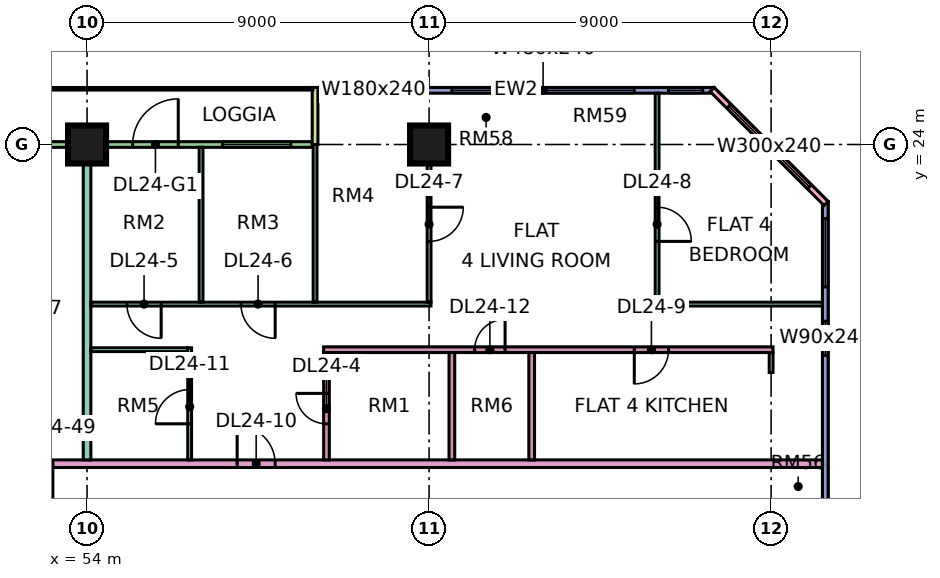
"""IFC4 building model, lengths in metres.
Left out: names, types, materials, properties, quantities, classifications, styles, units other than length and angle.
Written with IfcOpenShell. Run it as: python <this file> out.ifc"""

import sys

from ifc_helpers import new_model, si_unit, direction, frame, frame_2d, origin, origin_2d, place, context, subcontext, project, spatial, rectangle, extrude, element, fill, save


model = new_model("IFC4")
c1 = context("Model", 3, precision=1e-05, world=origin(), true_north=direction((0.0, 1.0)))
c2 = subcontext(c1, "Body", "Model", "MODEL_VIEW")
j1 = project(units=[si_unit("LENGTHUNIT", "METRE"), si_unit("PLANEANGLEUNIT", "RADIAN")], contexts=[c1])
p1 = place(None, origin())
s1 = spatial("IfcSite", under=j1, at=p1, CompositionType="ELEMENT")
p2 = place(p1, origin())
s2 = spatial("IfcBuilding", under=s1, at=p2, CompositionType="ELEMENT")
p3 = place(p2, frame((0.0, 0.0, 106.9)))
s3 = spatial("IfcBuildingStorey", under=s2, at=p3, CompositionType="ELEMENT", Elevation=106.9)
for number, where, z_axis, x_axis in (
    (1, (54.0, 24.0, 0.0), (0.0, 0.0, 1.0), (1.0, 0.0, 0.0)),
    (2, (63.0, 24.0, 0.0), (0.0, 0.0, 1.0), (1.0, 0.0, 0.0)),
):
    element("IfcColumn", number, at=place(p3, frame(where, z_axis=z_axis, x_axis=x_axis)), inside=s3, PredefinedType="COLUMN", context=c2, shape_type="SweptSolid", body=[
        extrude(rectangle(XDim=1.0, YDim=1.0, at=origin_2d()), origin(), (0.0, 0.0, 1.0), 3.75),
    ])
p4 = place(p3, frame((70.5, 25.425, 0.0), z_axis=(0.0, 0.0, 1.0), x_axis=(-1.0, 0.0, 0.0)))
e3 = element("IfcWall", 3, at=p4, inside=s3, PredefinedType="SOLIDWALL", context=c2, shape_type="SweptSolid", body=[
    extrude(rectangle(XDim=10.425, YDim=0.15, at=frame_2d((5.212, 0.0))), origin(), (0.0, 0.0, 1.0), 3.35),
])
p5 = place(p4, frame((0.3, 0.0, 0.45)))
e4 = element("IfcOpeningElement", 4, at=p5, cuts=e3, PredefinedType="OPENING", context=c2, shape_type="SweptSolid", body=[
    extrude(rectangle(XDim=0.9, YDim=2.4, at=frame_2d((0.45, 1.2))), frame((0.0, 0.085, 0.0), z_axis=(0.0, -1.0, 0.0), x_axis=(1.0, 0.0, 0.0)), (0.0, 0.0, 1.0), 0.17),
])
p6 = place(p4, frame((2.1, 0.0, 0.45)))
e5 = element("IfcOpeningElement", 5, at=p6, cuts=e3, PredefinedType="OPENING", context=c2, shape_type="SweptSolid", body=[
    extrude(rectangle(XDim=4.8, YDim=2.4, at=frame_2d((2.4, 1.2))), frame((0.0, 0.085, 0.0), z_axis=(0.0, -1.0, 0.0), x_axis=(1.0, 0.0, 0.0)), (0.0, 0.0, 1.0), 0.17),
])
p7 = place(p4, frame((8.062, 0.0, 0.45)))
e6 = element("IfcOpeningElement", 6, at=p7, cuts=e3, PredefinedType="OPENING", context=c2, shape_type="SweptSolid", body=[
    extrude(rectangle(XDim=1.8, YDim=2.4, at=frame_2d((0.9, 1.2))), frame((0.0, 0.085, 0.0), z_axis=(0.0, -1.0, 0.0), x_axis=(1.0, 0.0, 0.0)), (0.0, 0.0, 1.0), 0.17),
])
p8 = place(p3, frame((59.925, 24.0, 0.0), z_axis=(0.0, 0.0, 1.0), x_axis=(-1.0, 0.0, 0.0)))
e7 = element("IfcWall", 7, at=p8, inside=s3, PredefinedType="SOLIDWALL", context=c2, shape_type="SweptSolid", body=[
    extrude(rectangle(XDim=11.85, YDim=0.15, at=frame_2d((5.925, 0.0))), origin(), (0.0, 0.0, 1.0), 3.35),
])
p9 = place(p8, frame((0.562, 0.0, 0.45)))
e8 = element("IfcOpeningElement", 8, at=p9, cuts=e7, PredefinedType="OPENING", context=c2, shape_type="SweptSolid", body=[
    extrude(rectangle(XDim=1.8, YDim=2.4, at=frame_2d((0.9, 1.2))), frame((0.0, 0.085, 0.0), z_axis=(0.0, -1.0, 0.0), x_axis=(1.0, 0.0, 0.0)), (0.0, 0.0, 1.0), 0.17),
])
p10 = place(p8, frame((3.525, 0.0, 0.0)))
e9 = element("IfcOpeningElement", 9, at=p10, cuts=e7, PredefinedType="OPENING", context=c2, shape_type="SweptSolid", body=[
    extrude(rectangle(XDim=1.2, YDim=2.4, at=frame_2d((0.6, 1.2))), frame((0.0, 0.085, 0.0), z_axis=(0.0, -1.0, 0.0), x_axis=(1.0, 0.0, 0.0)), (0.0, 0.0, 1.0), 0.17),
])
p11 = place(p8, frame((7.087, 0.0, 0.45)))
e10 = element("IfcOpeningElement", 10, at=p11, cuts=e7, PredefinedType="OPENING", context=c2, shape_type="SweptSolid", body=[
    extrude(rectangle(XDim=4.2, YDim=2.4, at=frame_2d((2.1, 1.2))), frame((0.0, 0.085, 0.0), z_axis=(0.0, -1.0, 0.0), x_axis=(1.0, 0.0, 0.0)), (0.0, 0.0, 1.0), 0.17),
])
p12 = place(p3, frame((60.0, 25.5, 0.0), z_axis=(0.0, 0.0, 1.0), x_axis=(0.0, -1.0, 0.0)))
e11 = element("IfcWall", 11, at=p12, inside=s3, PredefinedType="SOLIDWALL", context=c2, shape_type="SweptSolid", body=[
    extrude(rectangle(XDim=1.5, YDim=0.15, at=frame_2d((0.75, 0.0))), origin(), (0.0, 0.0, 1.0), 3.35),
])
p13 = place(p3, frame((73.425, 12.075, 0.0), z_axis=(0.0, 0.0, 1.0), x_axis=(0.0, 1.0, 0.0)))
e12 = element("IfcWall", 12, at=p13, inside=s3, PredefinedType="SOLIDWALL", context=c2, shape_type="SweptSolid", body=[
    extrude(rectangle(XDim=10.425, YDim=0.15, at=frame_2d((5.212, 0.0))), origin(), (0.0, 0.0, 1.0), 3.35),
])
p14 = place(p13, frame((6.375, 0.0, 0.45)))
e13 = element("IfcOpeningElement", 13, at=p14, cuts=e12, PredefinedType="OPENING", context=c2, shape_type="SweptSolid", body=[
    extrude(rectangle(XDim=0.9, YDim=2.4, at=frame_2d((0.45, 1.2))), frame((0.0, 0.085, 0.0), z_axis=(0.0, -1.0, 0.0), x_axis=(1.0, 0.0, 0.0)), (0.0, 0.0, 1.0), 0.17),
])
p15 = place(p13, frame((8.175, 0.0, 0.45)))
e14 = element("IfcOpeningElement", 14, at=p15, cuts=e12, PredefinedType="OPENING", context=c2, shape_type="SweptSolid", body=[
    extrude(rectangle(XDim=1.8, YDim=2.4, at=frame_2d((0.9, 1.2))), frame((0.0, 0.085, 0.0), z_axis=(0.0, -1.0, 0.0), x_axis=(1.0, 0.0, 0.0)), (0.0, 0.0, 1.0), 0.17),
])
p16 = place(p3, frame((73.447, 22.447, 0.0), z_axis=(0.0, 0.0, 1.0), x_axis=(-0.707106781187, 0.707106781187, 0.0)))
e15 = element("IfcWall", 15, at=p16, inside=s3, PredefinedType="SOLIDWALL", context=c2, shape_type="SweptSolid", body=[
    extrude(rectangle(XDim=4.243, YDim=0.15, at=frame_2d((2.121, 0.0))), origin(), (0.0, 0.0, 1.0), 3.35),
])
p17 = place(p16, frame((0.621, 0.0, 0.45)))
e16 = element("IfcOpeningElement", 16, at=p17, cuts=e15, PredefinedType="OPENING", context=c2, shape_type="SweptSolid", body=[
    extrude(rectangle(XDim=3.0, YDim=2.4, at=frame_2d((1.5, 1.2))), frame((0.0, 0.085, 0.0), z_axis=(0.0, -1.0, 0.0), x_axis=(1.0, 0.0, 0.0)), (0.0, 0.0, 1.0), 0.17),
])
p18 = place(p3, frame((51.225, 15.6, 0.0), z_axis=(0.0, 0.0, 1.0), x_axis=(1.0, 0.0, 0.0)))
e17 = element("IfcWall", 17, at=p18, inside=s3, PredefinedType="PARTITIONING", context=c2, shape_type="SweptSolid", body=[
    extrude(rectangle(XDim=22.125, YDim=0.2, at=frame_2d((11.062, 0.0))), origin(), (0.0, 0.0, 1.0), 3.35),
])
p19 = place(p18, frame((6.725, 0.0, 0.0)))
e18 = element("IfcOpeningElement", 18, at=p19, cuts=e17, PredefinedType="OPENING", context=c2, shape_type="SweptSolid", body=[
    extrude(rectangle(XDim=1.0, YDim=2.1, at=frame_2d((0.5, 1.05))), frame((0.0, 0.11, 0.0), z_axis=(0.0, -1.0, 0.0), x_axis=(1.0, 0.0, 0.0)), (0.0, 0.0, 1.0), 0.22),
])
p20 = place(p18, frame((0.875, 0.0, 0.0)))
e19 = element("IfcOpeningElement", 19, at=p20, cuts=e17, PredefinedType="OPENING", context=c2, shape_type="SweptSolid", body=[
    extrude(rectangle(XDim=1.0, YDim=2.1, at=frame_2d((0.5, 1.05))), frame((0.0, 0.11, 0.0), z_axis=(0.0, -1.0, 0.0), x_axis=(1.0, 0.0, 0.0)), (0.0, 0.0, 1.0), 0.22),
])
p21 = place(p3, frame((54.0, 15.7, 0.0), z_axis=(0.0, 0.0, 1.0), x_axis=(0.0, 1.0, 0.0)))
e20 = element("IfcWall", 20, at=p21, inside=s3, PredefinedType="PARTITIONING", context=c2, shape_type="SweptSolid", body=[
    extrude(rectangle(XDim=8.226, YDim=0.2, at=frame_2d((4.113, 0.0))), origin(), (0.0, 0.0, 1.0), 3.35),
])
p22 = place(p3, frame((54.1, 18.6, 0.0), z_axis=(0.0, 0.0, 1.0), x_axis=(1.0, 0.0, 0.0)))
e21 = element("IfcWall", 21, at=p22, inside=s3, PredefinedType="PARTITIONING", context=c2, shape_type="SweptSolid", body=[
    extrude(rectangle(XDim=2.55, YDim=0.1, at=frame_2d((1.275, 0.0))), origin(), (0.0, 0.0, 1.0), 3.35),
])
p23 = place(p3, frame((54.1, 19.8, 0.0), z_axis=(0.0, 0.0, 1.0), x_axis=(1.0, 0.0, 0.0)))
e22 = element("IfcWall", 22, at=p23, inside=s3, PredefinedType="PARTITIONING", context=c2, shape_type="SweptSolid", body=[
    extrude(rectangle(XDim=8.95, YDim=0.1, at=frame_2d((4.475, 0.0))), origin(), (0.0, 0.0, 1.0), 3.35),
])
p24 = place(p23, frame((0.95, 0.0, 0.0)))
e23 = element("IfcOpeningElement", 23, at=p24, cuts=e22, PredefinedType="OPENING", context=c2, shape_type="SweptSolid", body=[
    extrude(rectangle(XDim=0.9, YDim=2.1, at=frame_2d((0.45, 1.05))), frame((0.0, 0.06, 0.0), z_axis=(0.0, -1.0, 0.0), x_axis=(1.0, 0.0, 0.0)), (0.0, 0.0, 1.0), 0.12),
])
p25 = place(p23, frame((3.95, 0.0, 0.0)))
e24 = element("IfcOpeningElement", 24, at=p25, cuts=e22, PredefinedType="OPENING", context=c2, shape_type="SweptSolid", body=[
    extrude(rectangle(XDim=0.9, YDim=2.1, at=frame_2d((0.45, 1.05))), frame((0.0, 0.06, 0.0), z_axis=(0.0, -1.0, 0.0), x_axis=(1.0, 0.0, 0.0)), (0.0, 0.0, 1.0), 0.12),
])
p26 = place(p3, frame((56.7, 15.7, 0.0), z_axis=(0.0, 0.0, 1.0), x_axis=(0.0, 1.0, 0.0)))
e25 = element("IfcWall", 25, at=p26, inside=s3, PredefinedType="PARTITIONING", context=c2, shape_type="SweptSolid", body=[
    extrude(rectangle(XDim=2.95, YDim=0.1, at=frame_2d((1.475, 0.0))), origin(), (0.0, 0.0, 1.0), 3.35),
])
p27 = place(p26, frame((0.95, 0.0, 0.0)))
e26 = element("IfcOpeningElement", 26, at=p27, cuts=e25, PredefinedType="OPENING", context=c2, shape_type="SweptSolid", body=[
    extrude(rectangle(XDim=0.9, YDim=2.1, at=frame_2d((0.45, 1.05))), frame((0.0, 0.06, 0.0), z_axis=(0.0, -1.0, 0.0), x_axis=(1.0, 0.0, 0.0)), (0.0, 0.0, 1.0), 0.12),
])
p28 = place(p3, frame((57.0, 19.85, 0.0), z_axis=(0.0, 0.0, 1.0), x_axis=(0.0, 1.0, 0.0)))
e27 = element("IfcWall", 27, at=p28, inside=s3, PredefinedType="PARTITIONING", context=c2, shape_type="SweptSolid", body=[
    extrude(rectangle(XDim=4.076, YDim=0.1, at=frame_2d((2.038, 0.0))), origin(), (0.0, 0.0, 1.0), 3.35),
])
p29 = place(p3, frame((60.0, 19.85, 0.0), z_axis=(0.0, 0.0, 1.0), x_axis=(0.0, 1.0, 0.0)))
e28 = element("IfcWall", 28, at=p29, inside=s3, PredefinedType="PARTITIONING", context=c2, shape_type="SweptSolid", body=[
    extrude(rectangle(XDim=4.15, YDim=0.1, at=frame_2d((2.075, 0.0))), origin(), (0.0, 0.0, 1.0), 3.35),
])
p30 = place(p3, frame((60.225, 18.6, 0.0), z_axis=(0.0, 0.0, 1.0), x_axis=(1.0, 0.0, 0.0)))
e29 = element("IfcWall", 29, at=p30, inside=s3, PredefinedType="PARTITIONING", context=c2, shape_type="SweptSolid", body=[
    extrude(rectangle(XDim=11.825, YDim=0.15, at=frame_2d((5.913, 0.0))), origin(), (0.0, 0.0, 1.0), 3.35),
])
p31 = place(p30, frame((8.175, 0.0, 0.0)))
e30 = element("IfcOpeningElement", 30, at=p31, cuts=e29, PredefinedType="OPENING", context=c2, shape_type="SweptSolid", body=[
    extrude(rectangle(XDim=0.9, YDim=2.1, at=frame_2d((0.45, 1.05))), frame((0.0, 0.085, 0.0), z_axis=(0.0, -1.0, 0.0), x_axis=(1.0, 0.0, 0.0)), (0.0, 0.0, 1.0), 0.17),
])
p32 = place(p30, frame((3.975, 0.0, 0.0)))
e31 = element("IfcOpeningElement", 31, at=p32, cuts=e29, PredefinedType="OPENING", context=c2, shape_type="SweptSolid", body=[
    extrude(rectangle(XDim=0.8, YDim=2.1, at=frame_2d((0.4, 1.05))), frame((0.0, 0.085, 0.0), z_axis=(0.0, -1.0, 0.0), x_axis=(1.0, 0.0, 0.0)), (0.0, 0.0, 1.0), 0.17),
])
p33 = place(p3, frame((60.3, 15.7, 0.0), z_axis=(0.0, 0.0, 1.0), x_axis=(0.0, 1.0, 0.0)))
e32 = element("IfcWall", 32, at=p33, inside=s3, PredefinedType="PARTITIONING", context=c2, shape_type="SweptSolid", body=[
    extrude(rectangle(XDim=2.825, YDim=0.15, at=frame_2d((1.413, 0.0))), origin(), (0.0, 0.0, 1.0), 3.35),
])
p34 = place(p33, frame((0.95, 0.0, 0.0)))
e33 = element("IfcOpeningElement", 33, at=p34, cuts=e32, PredefinedType="OPENING", context=c2, shape_type="SweptSolid", body=[
    extrude(rectangle(XDim=0.8, YDim=2.1, at=frame_2d((0.4, 1.05))), frame((0.0, 0.085, 0.0), z_axis=(0.0, -1.0, 0.0), x_axis=(1.0, 0.0, 0.0)), (0.0, 0.0, 1.0), 0.17),
])
p35 = place(p3, frame((63.0, 19.85, 0.0), z_axis=(0.0, 0.0, 1.0), x_axis=(0.0, 1.0, 0.0)))
e34 = element("IfcWall", 34, at=p35, inside=s3, PredefinedType="PARTITIONING", context=c2, shape_type="SweptSolid", body=[
    extrude(rectangle(XDim=4.15, YDim=0.1, at=frame_2d((2.075, 0.0))), origin(), (0.0, 0.0, 1.0), 3.35),
])
p36 = place(p35, frame((1.6, 0.0, 0.0)))
e35 = element("IfcOpeningElement", 35, at=p36, cuts=e34, PredefinedType="OPENING", context=c2, shape_type="SweptSolid", body=[
    extrude(rectangle(XDim=0.9, YDim=2.1, at=frame_2d((0.45, 1.05))), frame((0.0, 0.06, 0.0), z_axis=(0.0, -1.0, 0.0), x_axis=(1.0, 0.0, 0.0)), (0.0, 0.0, 1.0), 0.12),
])
for number, where, z_axis, x_axis in (
    (36, (63.6, 15.7, 0.0), (0.0, 0.0, 1.0), (0.0, 1.0, 0.0)),
    (37, (65.7, 15.7, 0.0), (0.0, 0.0, 1.0), (0.0, 1.0, 0.0)),
):
    element("IfcWall", number, at=place(p3, frame(where, z_axis=z_axis, x_axis=x_axis)), inside=s3, PredefinedType="PARTITIONING", context=c2, shape_type="SweptSolid", body=[
        extrude(rectangle(XDim=2.825, YDim=0.15, at=frame_2d((1.413, 0.0))), origin(), (0.0, 0.0, 1.0), 3.35),
    ])
p37 = place(p3, frame((68.95, 19.8, 0.0), z_axis=(0.0, 0.0, 1.0), x_axis=(1.0, 0.0, 0.0)))
e38 = element("IfcWall", 38, at=p37, inside=s3, PredefinedType="PARTITIONING", context=c2, shape_type="SweptSolid", body=[
    extrude(rectangle(XDim=4.401, YDim=0.1, at=frame_2d((2.201, 0.0))), origin(), (0.0, 0.0, 1.0), 3.35),
])
p38 = place(p3, frame((69.0, 19.85, 0.0), z_axis=(0.0, 0.0, 1.0), x_axis=(0.0, 1.0, 0.0)))
e39 = element("IfcWall", 39, at=p38, inside=s3, PredefinedType="PARTITIONING", context=c2, shape_type="SweptSolid", body=[
    extrude(rectangle(XDim=5.5, YDim=0.1, at=frame_2d((2.75, 0.0))), origin(), (0.0, 0.0, 1.0), 3.35),
])
p39 = place(p38, frame((1.6, 0.0, 0.0)))
e40 = element("IfcOpeningElement", 40, at=p39, cuts=e39, PredefinedType="OPENING", context=c2, shape_type="SweptSolid", body=[
    extrude(rectangle(XDim=0.9, YDim=2.1, at=frame_2d((0.45, 1.05))), frame((0.0, 0.06, 0.0), z_axis=(0.0, -1.0, 0.0), x_axis=(1.0, 0.0, 0.0)), (0.0, 0.0, 1.0), 0.12),
])
p40 = place(p3, frame((72.0, 18.0, 0.0), z_axis=(0.0, 0.0, 1.0), x_axis=(0.0, 1.0, 0.0)))
e41 = element("IfcWall", 41, at=p40, inside=s3, PredefinedType="PARTITIONING", context=c2, shape_type="SweptSolid", body=[
    extrude(rectangle(XDim=0.525, YDim=0.1, at=frame_2d((0.262, 0.0))), origin(), (0.0, 0.0, 1.0), 3.35),
])
p41 = place(p5, origin())
e42 = element("IfcWindow", 42, at=p41, inside=s3, PartitioningType="SINGLE_PANEL", PredefinedType="WINDOW", context=c2, shape_type="SweptSolid", body=[
    extrude(rectangle(XDim=0.9, YDim=2.4, at=frame_2d((0.45, 1.2))), frame((0.0, 0.03, 0.0), z_axis=(0.0, -1.0, 0.0), x_axis=(1.0, 0.0, 0.0)), (0.0, 0.0, 1.0), 0.06),
])
fill(e4, e42)
p42 = place(p6, origin())
e43 = element("IfcWindow", 43, at=p42, inside=s3, PartitioningType="SINGLE_PANEL", PredefinedType="WINDOW", context=c2, shape_type="SweptSolid", body=[
    extrude(rectangle(XDim=4.8, YDim=2.4, at=frame_2d((2.4, 1.2))), frame((0.0, 0.03, 0.0), z_axis=(0.0, -1.0, 0.0), x_axis=(1.0, 0.0, 0.0)), (0.0, 0.0, 1.0), 0.06),
])
fill(e5, e43)
p43 = place(p7, origin())
e44 = element("IfcWindow", 44, at=p43, inside=s3, PartitioningType="SINGLE_PANEL", PredefinedType="WINDOW", context=c2, shape_type="SweptSolid", body=[
    extrude(rectangle(XDim=1.8, YDim=2.4, at=frame_2d((0.9, 1.2))), frame((0.0, 0.03, 0.0), z_axis=(0.0, -1.0, 0.0), x_axis=(1.0, 0.0, 0.0)), (0.0, 0.0, 1.0), 0.06),
])
fill(e6, e44)
p44 = place(p9, origin())
e45 = element("IfcWindow", 45, at=p44, inside=s3, PartitioningType="SINGLE_PANEL", PredefinedType="WINDOW", context=c2, shape_type="SweptSolid", body=[
    extrude(rectangle(XDim=1.8, YDim=2.4, at=frame_2d((0.9, 1.2))), frame((0.0, 0.03, 0.0), z_axis=(0.0, -1.0, 0.0), x_axis=(1.0, 0.0, 0.0)), (0.0, 0.0, 1.0), 0.06),
])
fill(e8, e45)
p45 = place(p10, frame((1.2, 0.0, 0.0), z_axis=(0.0, 0.0, 1.0), x_axis=(-1.0, 0.0, 0.0)))
e46 = element("IfcDoor", 46, at=p45, inside=s3, OperationType="DOUBLE_DOOR_SINGLE_SWING", PredefinedType="DOOR", context=c2, shape_type="SweptSolid", body=[
    extrude(rectangle(XDim=1.2, YDim=2.4, at=frame_2d((0.6, 1.2))), frame((0.0, 0.025, 0.0), z_axis=(0.0, -1.0, 0.0), x_axis=(1.0, 0.0, 0.0)), (0.0, 0.0, 1.0), 0.05),
])
fill(e9, e46)
p46 = place(p14, origin())
e47 = element("IfcWindow", 47, at=p46, inside=s3, PartitioningType="SINGLE_PANEL", PredefinedType="WINDOW", context=c2, shape_type="SweptSolid", body=[
    extrude(rectangle(XDim=0.9, YDim=2.4, at=frame_2d((0.45, 1.2))), frame((0.0, 0.03, 0.0), z_axis=(0.0, -1.0, 0.0), x_axis=(1.0, 0.0, 0.0)), (0.0, 0.0, 1.0), 0.06),
])
fill(e13, e47)
p47 = place(p15, origin())
e48 = element("IfcWindow", 48, at=p47, inside=s3, PartitioningType="SINGLE_PANEL", PredefinedType="WINDOW", context=c2, shape_type="SweptSolid", body=[
    extrude(rectangle(XDim=1.8, YDim=2.4, at=frame_2d((0.9, 1.2))), frame((0.0, 0.03, 0.0), z_axis=(0.0, -1.0, 0.0), x_axis=(1.0, 0.0, 0.0)), (0.0, 0.0, 1.0), 0.06),
])
fill(e14, e48)
p48 = place(p17, origin())
e49 = element("IfcWindow", 49, at=p48, inside=s3, PartitioningType="SINGLE_PANEL", PredefinedType="WINDOW", context=c2, shape_type="SweptSolid", body=[
    extrude(rectangle(XDim=3.0, YDim=2.4, at=frame_2d((1.5, 1.2))), frame((0.0, 0.03, 0.0), z_axis=(0.0, -1.0, 0.0), x_axis=(1.0, 0.0, 0.0)), (0.0, 0.0, 1.0), 0.06),
])
fill(e16, e49)
p49 = place(p34, frame((0.8, 0.0, 0.0), z_axis=(0.0, 0.0, 1.0), x_axis=(-1.0, 0.0, 0.0)))
e50 = element("IfcDoor", 50, at=p49, inside=s3, OperationType="SINGLE_SWING_RIGHT", PredefinedType="DOOR", context=c2, shape_type="SweptSolid", body=[
    extrude(rectangle(XDim=0.8, YDim=2.1, at=frame_2d((0.4, 1.05))), frame((0.0, 0.025, 0.0), z_axis=(0.0, -1.0, 0.0), x_axis=(1.0, 0.0, 0.0)), (0.0, 0.0, 1.0), 0.05),
])
fill(e33, e50)
p50 = place(p24, origin())
e51 = element("IfcDoor", 51, at=p50, inside=s3, OperationType="SINGLE_SWING_RIGHT", PredefinedType="DOOR", context=c2, shape_type="SweptSolid", body=[
    extrude(rectangle(XDim=0.9, YDim=2.1, at=frame_2d((0.45, 1.05))), frame((0.0, 0.025, 0.0), z_axis=(0.0, -1.0, 0.0), x_axis=(1.0, 0.0, 0.0)), (0.0, 0.0, 1.0), 0.05),
])
fill(e23, e51)
p51 = place(p25, origin())
e52 = element("IfcDoor", 52, at=p51, inside=s3, OperationType="SINGLE_SWING_RIGHT", PredefinedType="DOOR", context=c2, shape_type="SweptSolid", body=[
    extrude(rectangle(XDim=0.9, YDim=2.1, at=frame_2d((0.45, 1.05))), frame((0.0, 0.025, 0.0), z_axis=(0.0, -1.0, 0.0), x_axis=(1.0, 0.0, 0.0)), (0.0, 0.0, 1.0), 0.05),
])
fill(e24, e52)
p52 = place(p36, origin())
e53 = element("IfcDoor", 53, at=p52, inside=s3, OperationType="SINGLE_SWING_RIGHT", PredefinedType="DOOR", context=c2, shape_type="SweptSolid", body=[
    extrude(rectangle(XDim=0.9, YDim=2.1, at=frame_2d((0.45, 1.05))), frame((0.0, 0.025, 0.0), z_axis=(0.0, -1.0, 0.0), x_axis=(1.0, 0.0, 0.0)), (0.0, 0.0, 1.0), 0.05),
])
fill(e35, e53)
p53 = place(p39, frame((0.9, 0.0, 0.0), z_axis=(0.0, 0.0, 1.0), x_axis=(-1.0, 0.0, 0.0)))
e54 = element("IfcDoor", 54, at=p53, inside=s3, OperationType="SINGLE_SWING_LEFT", PredefinedType="DOOR", context=c2, shape_type="SweptSolid", body=[
    extrude(rectangle(XDim=0.9, YDim=2.1, at=frame_2d((0.45, 1.05))), frame((0.0, 0.025, 0.0), z_axis=(0.0, -1.0, 0.0), x_axis=(1.0, 0.0, 0.0)), (0.0, 0.0, 1.0), 0.05),
])
fill(e40, e54)
p54 = place(p31, frame((0.9, 0.0, 0.0), z_axis=(0.0, 0.0, 1.0), x_axis=(-1.0, 0.0, 0.0)))
e55 = element("IfcDoor", 55, at=p54, inside=s3, OperationType="SINGLE_SWING_LEFT", PredefinedType="DOOR", context=c2, shape_type="SweptSolid", body=[
    extrude(rectangle(XDim=0.9, YDim=2.1, at=frame_2d((0.45, 1.05))), frame((0.0, 0.025, 0.0), z_axis=(0.0, -1.0, 0.0), x_axis=(1.0, 0.0, 0.0)), (0.0, 0.0, 1.0), 0.05),
])
fill(e30, e55)
p55 = place(p19, origin())
e56 = element("IfcDoor", 56, at=p55, inside=s3, OperationType="SINGLE_SWING_LEFT", PredefinedType="DOOR", context=c2, shape_type="SweptSolid", body=[
    extrude(rectangle(XDim=1.0, YDim=2.1, at=frame_2d((0.5, 1.05))), frame((0.0, 0.025, 0.0), z_axis=(0.0, -1.0, 0.0), x_axis=(1.0, 0.0, 0.0)), (0.0, 0.0, 1.0), 0.05),
])
fill(e18, e56)
p56 = place(p27, origin())
e57 = element("IfcDoor", 57, at=p56, inside=s3, OperationType="SINGLE_SWING_LEFT", PredefinedType="DOOR", context=c2, shape_type="SweptSolid", body=[
    extrude(rectangle(XDim=0.9, YDim=2.1, at=frame_2d((0.45, 1.05))), frame((0.0, 0.025, 0.0), z_axis=(0.0, -1.0, 0.0), x_axis=(1.0, 0.0, 0.0)), (0.0, 0.0, 1.0), 0.05),
])
fill(e26, e57)
p57 = place(p32, frame((0.8, 0.0, 0.0), z_axis=(0.0, 0.0, 1.0), x_axis=(-1.0, 0.0, 0.0)))
e58 = element("IfcDoor", 58, at=p57, inside=s3, OperationType="SINGLE_SWING_RIGHT", PredefinedType="DOOR", context=c2, shape_type="SweptSolid", body=[
    extrude(rectangle(XDim=0.8, YDim=2.1, at=frame_2d((0.4, 1.05))), frame((0.0, 0.025, 0.0), z_axis=(0.0, -1.0, 0.0), x_axis=(1.0, 0.0, 0.0)), (0.0, 0.0, 1.0), 0.05),
])
fill(e31, e58)
p58 = place(p20, origin())
e59 = element("IfcDoor", 59, at=p58, inside=s3, OperationType="SINGLE_SWING_RIGHT", PredefinedType="DOOR", context=c2, shape_type="SweptSolid", body=[
    extrude(rectangle(XDim=1.0, YDim=2.1, at=frame_2d((0.5, 1.05))), frame((0.0, 0.025, 0.0), z_axis=(0.0, -1.0, 0.0), x_axis=(1.0, 0.0, 0.0)), (0.0, 0.0, 1.0), 0.05),
])
fill(e19, e59)
save(model, sys.argv[1])
